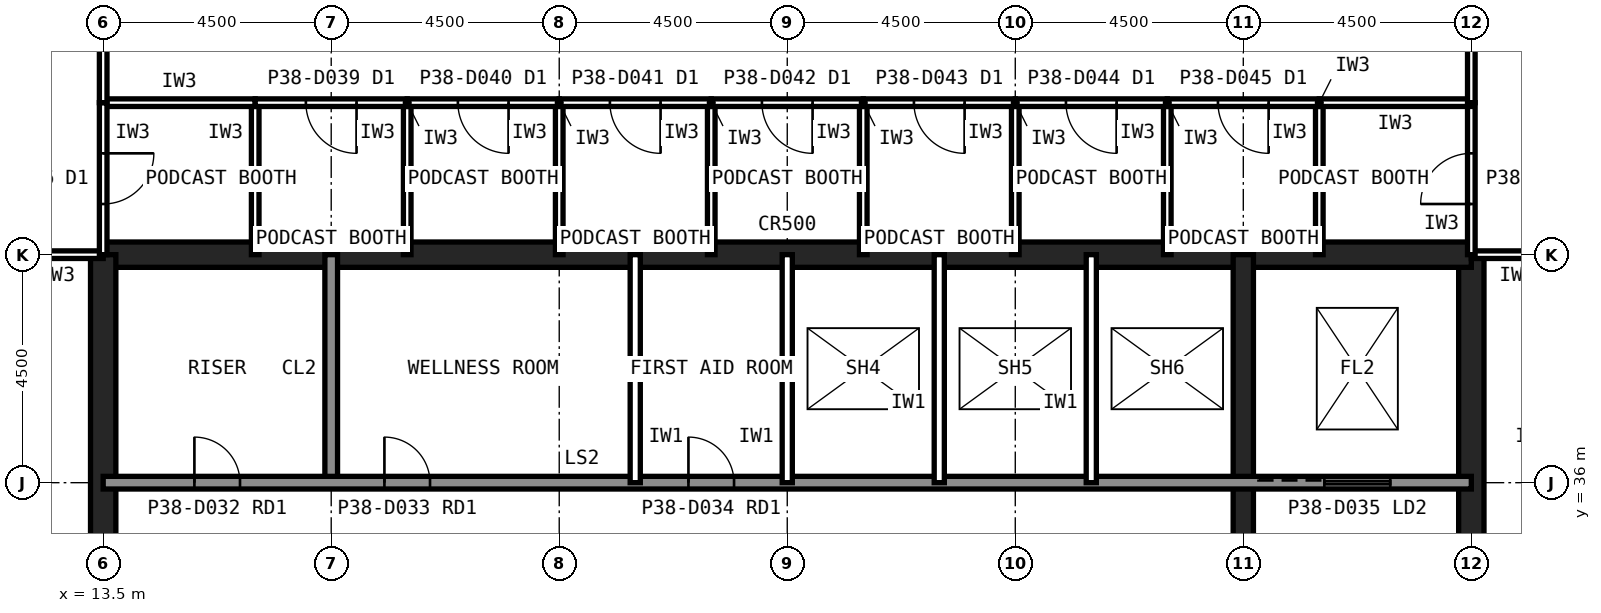
"""IFC4 building model, lengths in metres.
Left out: names, types, materials, properties, quantities, classifications, styles, units other than length and angle.
Written with IfcOpenShell. Run it as: python <this file> out.ifc"""

import sys

from ifc_helpers import new_model, si_unit, direction, frame, frame_2d, origin, place, context, subcontext, project, spatial, rectangle, extrude, element, fill, save


model = new_model("IFC4")
c1 = context("Model", 3, precision=1e-05, world=origin(), true_north=direction((0.0, 1.0)))
c2 = subcontext(c1, "Body", "Model", "MODEL_VIEW")
j1 = project(units=[si_unit("LENGTHUNIT", "METRE"), si_unit("PLANEANGLEUNIT", "RADIAN")], contexts=[c1])
p1 = place(None, origin())
s1 = spatial("IfcSite", under=j1, at=p1, CompositionType="ELEMENT")
p2 = place(p1, origin())
s2 = spatial("IfcBuilding", under=s1, at=p2, CompositionType="ELEMENT")
p3 = place(p2, frame((0.0, 0.0, 159.6)))
s3 = spatial("IfcBuildingStorey", under=s2, at=p3, CompositionType="ELEMENT", Elevation=159.6)
p4 = place(p3, frame((40.5, 13.5, 0.0), z_axis=(0.0, 0.0, 1.0), x_axis=(0.0, 1.0, 0.0)))
e1 = element("IfcWall", 1, at=p4, inside=s3, PredefinedType="SHEAR", context=c2, shape_type="SweptSolid", body=[
    extrude(rectangle(XDim=27.0, YDim=0.5, at=frame_2d((13.5, 0.0))), origin(), (0.0, 0.0, 1.0), 4.0),
])
p5 = place(p4, frame((5.85, 0.0, 0.0)))
e2 = element("IfcOpeningElement", 2, at=p5, cuts=e1, PredefinedType="OPENING", context=c2, shape_type="SweptSolid", body=[
    extrude(rectangle(XDim=1.8, YDim=2.1, at=frame_2d((0.9, 1.05))), frame((0.0, 0.26, 0.0), z_axis=(0.0, -1.0, 0.0), x_axis=(1.0, 0.0, 0.0)), (0.0, 0.0, 1.0), 0.52),
])
p6 = place(p4, frame((19.65, 0.0, 0.0)))
e3 = element("IfcOpeningElement", 3, at=p6, cuts=e1, PredefinedType="OPENING", context=c2, shape_type="SweptSolid", body=[
    extrude(rectangle(XDim=1.2, YDim=2.1, at=frame_2d((0.6, 1.05))), frame((0.0, 0.26, 0.0), z_axis=(0.0, -1.0, 0.0), x_axis=(1.0, 0.0, 0.0)), (0.0, 0.0, 1.0), 0.52),
])
p7 = place(p3, frame((40.5, 40.5, 0.0), z_axis=(0.0, 0.0, 1.0), x_axis=(-1.0, 0.0, 0.0)))
e4 = element("IfcWall", 4, at=p7, inside=s3, PredefinedType="SHEAR", context=c2, shape_type="SweptSolid", body=[
    extrude(rectangle(XDim=27.0, YDim=0.5, at=frame_2d((13.5, 0.0))), origin(), (0.0, 0.0, 1.0), 4.0),
])
p8 = place(p3, frame((13.5, 40.5, 0.0), z_axis=(0.0, 0.0, 1.0), x_axis=(0.0, -1.0, 0.0)))
e5 = element("IfcWall", 5, at=p8, inside=s3, PredefinedType="SHEAR", context=c2, shape_type="SweptSolid", body=[
    extrude(rectangle(XDim=27.0, YDim=0.5, at=frame_2d((13.5, 0.0))), origin(), (0.0, 0.0, 1.0), 4.0),
])
p9 = place(p8, frame((19.65, 0.0, 0.0)))
e6 = element("IfcOpeningElement", 6, at=p9, cuts=e5, PredefinedType="OPENING", context=c2, shape_type="SweptSolid", body=[
    extrude(rectangle(XDim=1.2, YDim=2.1, at=frame_2d((0.6, 1.05))), frame((0.0, 0.26, 0.0), z_axis=(0.0, -1.0, 0.0), x_axis=(1.0, 0.0, 0.0)), (0.0, 0.0, 1.0), 0.52),
])
p10 = place(p8, frame((5.85, 0.0, 0.0)))
e7 = element("IfcOpeningElement", 7, at=p10, cuts=e5, PredefinedType="OPENING", context=c2, shape_type="SweptSolid", body=[
    extrude(rectangle(XDim=1.8, YDim=2.1, at=frame_2d((0.9, 1.05))), frame((0.0, 0.26, 0.0), z_axis=(0.0, -1.0, 0.0), x_axis=(1.0, 0.0, 0.0)), (0.0, 0.0, 1.0), 0.52),
])
p11 = place(p3, frame((18.0, 36.0, 0.0), z_axis=(0.0, 0.0, 1.0), x_axis=(0.0, 1.0, 0.0)))
e8 = element("IfcWall", 8, at=p11, inside=s3, PredefinedType="SOLIDWALL", context=c2, shape_type="SweptSolid", body=[
    extrude(rectangle(XDim=4.5, YDim=0.25, at=frame_2d((2.25, 0.0))), origin(), (0.0, 0.0, 1.0), 3.84),
])
p12 = place(p3, frame((36.0, 22.5, 0.0), z_axis=(0.0, 0.0, 1.0), x_axis=(0.0, 1.0, 0.0)))
e9 = element("IfcWall", 9, at=p12, inside=s3, PredefinedType="SHEAR", context=c2, shape_type="SweptSolid", body=[
    extrude(rectangle(XDim=18.0, YDim=0.4, at=frame_2d((9.0, 0.0))), origin(), (0.0, 0.0, 1.0), 4.0),
])
p13 = place(p3, frame((13.5, 36.0, 0.0), z_axis=(0.0, 0.0, 1.0), x_axis=(1.0, 0.0, 0.0)))
e10 = element("IfcWall", 10, at=p13, inside=s3, PredefinedType="SOLIDWALL", context=c2, shape_type="SweptSolid", body=[
    extrude(rectangle(XDim=27.0, YDim=0.25, at=frame_2d((13.5, 0.0))), origin(), (0.0, 0.0, 1.0), 3.84),
])
p14 = place(p13, frame((1.8, 0.0, 0.0)))
e11 = element("IfcOpeningElement", 11, at=p14, cuts=e10, PredefinedType="OPENING", context=c2, shape_type="SweptSolid", body=[
    extrude(rectangle(XDim=0.9, YDim=2.1, at=frame_2d((0.45, 1.05))), frame((0.0, 0.135, 0.0), z_axis=(0.0, -1.0, 0.0), x_axis=(1.0, 0.0, 0.0)), (0.0, 0.0, 1.0), 0.27),
])
p15 = place(p13, frame((5.55, 0.0, 0.0)))
e12 = element("IfcOpeningElement", 12, at=p15, cuts=e10, PredefinedType="OPENING", context=c2, shape_type="SweptSolid", body=[
    extrude(rectangle(XDim=0.9, YDim=2.1, at=frame_2d((0.45, 1.05))), frame((0.0, 0.135, 0.0), z_axis=(0.0, -1.0, 0.0), x_axis=(1.0, 0.0, 0.0)), (0.0, 0.0, 1.0), 0.27),
])
p16 = place(p13, frame((8.55, 0.0, 0.0)))
e13 = element("IfcOpeningElement", 13, at=p16, cuts=e10, PredefinedType="OPENING", context=c2, shape_type="SweptSolid", body=[
    extrude(rectangle(XDim=0.9, YDim=2.1, at=frame_2d((0.45, 1.05))), frame((0.0, 0.135, 0.0), z_axis=(0.0, -1.0, 0.0), x_axis=(1.0, 0.0, 0.0)), (0.0, 0.0, 1.0), 0.27),
])
p17 = place(p13, frame((11.55, 0.0, 0.0)))
e14 = element("IfcOpeningElement", 14, at=p17, cuts=e10, PredefinedType="OPENING", context=c2, shape_type="SweptSolid", body=[
    extrude(rectangle(XDim=0.9, YDim=2.1, at=frame_2d((0.45, 1.05))), frame((0.0, 0.135, 0.0), z_axis=(0.0, -1.0, 0.0), x_axis=(1.0, 0.0, 0.0)), (0.0, 0.0, 1.0), 0.27),
])
p18 = place(p13, frame((24.1, 0.0, 0.0)))
e15 = element("IfcOpeningElement", 15, at=p18, cuts=e10, PredefinedType="OPENING", context=c2, shape_type="SweptSolid", body=[
    extrude(rectangle(XDim=1.3, YDim=2.2, at=frame_2d((0.65, 1.1))), frame((0.0, 0.135, 0.0), z_axis=(0.0, -1.0, 0.0), x_axis=(1.0, 0.0, 0.0)), (0.0, 0.0, 1.0), 0.27),
])
for number, where, z_axis, x_axis in (
    (16, (21.0, 36.0, 0.0), (0.0, 0.0, 1.0), (0.0, 1.0, 0.0)),
    (17, (24.0, 36.0, 0.0), (0.0, 0.0, 1.0), (0.0, 1.0, 0.0)),
    (18, (27.0, 36.0, 0.0), (0.0, 0.0, 1.0), (0.0, 1.0, 0.0)),
    (19, (30.0, 36.0, 0.0), (0.0, 0.0, 1.0), (0.0, 1.0, 0.0)),
    (20, (33.0, 36.0, 0.0), (0.0, 0.0, 1.0), (0.0, 1.0, 0.0)),
):
    element("IfcWall", number, at=place(p3, frame(where, z_axis=z_axis, x_axis=x_axis)), inside=s3, PredefinedType="PARTITIONING", context=c2, shape_type="SweptSolid", body=[
        extrude(rectangle(XDim=4.5, YDim=0.2, at=frame_2d((2.25, 0.0))), origin(), (0.0, 0.0, 1.0), 3.84),
    ])
for number, where, z_axis, x_axis in (
    (21, (22.5, 43.5, 0.0), (0.0, 0.0, 1.0), (0.0, 1.0, 0.0)),
    (22, (42.3, 40.5, 0.0), (0.0, 0.0, 1.0), (-1.0, 0.0, 0.0)),
):
    element("IfcWall", number, at=place(p3, frame(where, z_axis=z_axis, x_axis=x_axis)), inside=s3, PredefinedType="PARTITIONING", context=c2, shape_type="SweptSolid", body=[
        extrude(rectangle(XDim=1.8, YDim=0.15, at=frame_2d((0.9, 0.0))), origin(), (0.0, 0.0, 1.0), 2.989),
    ])
for number, where, z_axis, x_axis in (
    (23, (16.5, 40.5, 0.0), (0.0, 0.0, 1.0), (0.0, 1.0, 0.0)),
    (24, (16.5, 43.5, 0.0), (0.0, 0.0, 1.0), (-1.0, 0.0, 0.0)),
):
    element("IfcWall", number, at=place(p3, frame(where, z_axis=z_axis, x_axis=x_axis)), inside=s3, PredefinedType="PARTITIONING", context=c2, shape_type="SweptSolid", body=[
        extrude(rectangle(XDim=3.0, YDim=0.15, at=frame_2d((1.5, 0.0))), origin(), (0.0, 0.0, 1.0), 3.84),
    ])
p19 = place(p3, frame((13.5, 43.5, 0.0), z_axis=(0.0, 0.0, 1.0), x_axis=(0.0, -1.0, 0.0)))
e25 = element("IfcWall", 25, at=p19, inside=s3, PredefinedType="PARTITIONING", context=c2, shape_type="SweptSolid", body=[
    extrude(rectangle(XDim=3.0, YDim=0.15, at=frame_2d((1.5, 0.0))), origin(), (0.0, 0.0, 1.0), 2.989),
])
p20 = place(p19, frame((1.0, 0.0, 0.0)))
e26 = element("IfcOpeningElement", 26, at=p20, cuts=e25, PredefinedType="OPENING", context=c2, shape_type="SweptSolid", body=[
    extrude(rectangle(XDim=1.0, YDim=2.1, at=frame_2d((0.5, 1.05))), frame((0.0, 0.085, 0.0), z_axis=(0.0, -1.0, 0.0), x_axis=(1.0, 0.0, 0.0)), (0.0, 0.0, 1.0), 0.17),
])
p21 = place(p3, frame((19.5, 40.5, 0.0), z_axis=(0.0, 0.0, 1.0), x_axis=(0.0, 1.0, 0.0)))
e27 = element("IfcWall", 27, at=p21, inside=s3, PredefinedType="PARTITIONING", context=c2, shape_type="SweptSolid", body=[
    extrude(rectangle(XDim=3.0, YDim=0.15, at=frame_2d((1.5, 0.0))), origin(), (0.0, 0.0, 1.0), 3.84),
])
p22 = place(p3, frame((19.5, 43.5, 0.0), z_axis=(0.0, 0.0, 1.0), x_axis=(-1.0, 0.0, 0.0)))
e28 = element("IfcWall", 28, at=p22, inside=s3, PredefinedType="PARTITIONING", context=c2, shape_type="SweptSolid", body=[
    extrude(rectangle(XDim=3.0, YDim=0.15, at=frame_2d((1.5, 0.0))), origin(), (0.0, 0.0, 1.0), 3.84),
])
p23 = place(p22, frame((1.0, 0.0, 0.0)))
e29 = element("IfcOpeningElement", 29, at=p23, cuts=e28, PredefinedType="OPENING", context=c2, shape_type="SweptSolid", body=[
    extrude(rectangle(XDim=1.0, YDim=2.1, at=frame_2d((0.5, 1.05))), frame((0.0, 0.085, 0.0), z_axis=(0.0, -1.0, 0.0), x_axis=(1.0, 0.0, 0.0)), (0.0, 0.0, 1.0), 0.17),
])
p24 = place(p3, frame((22.5, 40.5, 0.0), z_axis=(0.0, 0.0, 1.0), x_axis=(0.0, 1.0, 0.0)))
e30 = element("IfcWall", 30, at=p24, inside=s3, PredefinedType="PARTITIONING", context=c2, shape_type="SweptSolid", body=[
    extrude(rectangle(XDim=3.0, YDim=0.15, at=frame_2d((1.5, 0.0))), origin(), (0.0, 0.0, 1.0), 2.989),
])
p25 = place(p3, frame((22.5, 43.5, 0.0), z_axis=(0.0, 0.0, 1.0), x_axis=(-1.0, 0.0, 0.0)))
e31 = element("IfcWall", 31, at=p25, inside=s3, PredefinedType="PARTITIONING", context=c2, shape_type="SweptSolid", body=[
    extrude(rectangle(XDim=3.0, YDim=0.15, at=frame_2d((1.5, 0.0))), origin(), (0.0, 0.0, 1.0), 3.84),
])
p26 = place(p25, frame((1.0, 0.0, 0.0)))
e32 = element("IfcOpeningElement", 32, at=p26, cuts=e31, PredefinedType="OPENING", context=c2, shape_type="SweptSolid", body=[
    extrude(rectangle(XDim=1.0, YDim=2.1, at=frame_2d((0.5, 1.05))), frame((0.0, 0.085, 0.0), z_axis=(0.0, -1.0, 0.0), x_axis=(1.0, 0.0, 0.0)), (0.0, 0.0, 1.0), 0.17),
])
p27 = place(p3, frame((25.5, 40.5, 0.0), z_axis=(0.0, 0.0, 1.0), x_axis=(0.0, 1.0, 0.0)))
e33 = element("IfcWall", 33, at=p27, inside=s3, PredefinedType="PARTITIONING", context=c2, shape_type="SweptSolid", body=[
    extrude(rectangle(XDim=3.0, YDim=0.15, at=frame_2d((1.5, 0.0))), origin(), (0.0, 0.0, 1.0), 3.84),
])
p28 = place(p3, frame((25.5, 43.5, 0.0), z_axis=(0.0, 0.0, 1.0), x_axis=(-1.0, 0.0, 0.0)))
e34 = element("IfcWall", 34, at=p28, inside=s3, PredefinedType="PARTITIONING", context=c2, shape_type="SweptSolid", body=[
    extrude(rectangle(XDim=3.0, YDim=0.15, at=frame_2d((1.5, 0.0))), origin(), (0.0, 0.0, 1.0), 3.84),
])
p29 = place(p28, frame((1.0, 0.0, 0.0)))
e35 = element("IfcOpeningElement", 35, at=p29, cuts=e34, PredefinedType="OPENING", context=c2, shape_type="SweptSolid", body=[
    extrude(rectangle(XDim=1.0, YDim=2.1, at=frame_2d((0.5, 1.05))), frame((0.0, 0.085, 0.0), z_axis=(0.0, -1.0, 0.0), x_axis=(1.0, 0.0, 0.0)), (0.0, 0.0, 1.0), 0.17),
])
p30 = place(p3, frame((28.5, 40.5, 0.0), z_axis=(0.0, 0.0, 1.0), x_axis=(0.0, 1.0, 0.0)))
e36 = element("IfcWall", 36, at=p30, inside=s3, PredefinedType="PARTITIONING", context=c2, shape_type="SweptSolid", body=[
    extrude(rectangle(XDim=3.0, YDim=0.15, at=frame_2d((1.5, 0.0))), origin(), (0.0, 0.0, 1.0), 3.84),
])
p31 = place(p3, frame((28.5, 43.5, 0.0), z_axis=(0.0, 0.0, 1.0), x_axis=(-1.0, 0.0, 0.0)))
e37 = element("IfcWall", 37, at=p31, inside=s3, PredefinedType="PARTITIONING", context=c2, shape_type="SweptSolid", body=[
    extrude(rectangle(XDim=3.0, YDim=0.15, at=frame_2d((1.5, 0.0))), origin(), (0.0, 0.0, 1.0), 3.84),
])
p32 = place(p31, frame((1.0, 0.0, 0.0)))
e38 = element("IfcOpeningElement", 38, at=p32, cuts=e37, PredefinedType="OPENING", context=c2, shape_type="SweptSolid", body=[
    extrude(rectangle(XDim=1.0, YDim=2.1, at=frame_2d((0.5, 1.05))), frame((0.0, 0.085, 0.0), z_axis=(0.0, -1.0, 0.0), x_axis=(1.0, 0.0, 0.0)), (0.0, 0.0, 1.0), 0.17),
])
p33 = place(p3, frame((31.5, 40.5, 0.0), z_axis=(0.0, 0.0, 1.0), x_axis=(0.0, 1.0, 0.0)))
e39 = element("IfcWall", 39, at=p33, inside=s3, PredefinedType="PARTITIONING", context=c2, shape_type="SweptSolid", body=[
    extrude(rectangle(XDim=3.0, YDim=0.15, at=frame_2d((1.5, 0.0))), origin(), (0.0, 0.0, 1.0), 2.989),
])
p34 = place(p3, frame((31.5, 43.5, 0.0), z_axis=(0.0, 0.0, 1.0), x_axis=(-1.0, 0.0, 0.0)))
e40 = element("IfcWall", 40, at=p34, inside=s3, PredefinedType="PARTITIONING", context=c2, shape_type="SweptSolid", body=[
    extrude(rectangle(XDim=3.0, YDim=0.15, at=frame_2d((1.5, 0.0))), origin(), (0.0, 0.0, 1.0), 3.84),
])
p35 = place(p34, frame((1.0, 0.0, 0.0)))
e41 = element("IfcOpeningElement", 41, at=p35, cuts=e40, PredefinedType="OPENING", context=c2, shape_type="SweptSolid", body=[
    extrude(rectangle(XDim=1.0, YDim=2.1, at=frame_2d((0.5, 1.05))), frame((0.0, 0.085, 0.0), z_axis=(0.0, -1.0, 0.0), x_axis=(1.0, 0.0, 0.0)), (0.0, 0.0, 1.0), 0.17),
])
p36 = place(p3, frame((34.5, 40.5, 0.0), z_axis=(0.0, 0.0, 1.0), x_axis=(0.0, 1.0, 0.0)))
e42 = element("IfcWall", 42, at=p36, inside=s3, PredefinedType="PARTITIONING", context=c2, shape_type="SweptSolid", body=[
    extrude(rectangle(XDim=3.0, YDim=0.15, at=frame_2d((1.5, 0.0))), origin(), (0.0, 0.0, 1.0), 3.84),
])
p37 = place(p3, frame((34.5, 43.5, 0.0), z_axis=(0.0, 0.0, 1.0), x_axis=(-1.0, 0.0, 0.0)))
e43 = element("IfcWall", 43, at=p37, inside=s3, PredefinedType="PARTITIONING", context=c2, shape_type="SweptSolid", body=[
    extrude(rectangle(XDim=3.0, YDim=0.15, at=frame_2d((1.5, 0.0))), origin(), (0.0, 0.0, 1.0), 3.84),
])
p38 = place(p37, frame((1.0, 0.0, 0.0)))
e44 = element("IfcOpeningElement", 44, at=p38, cuts=e43, PredefinedType="OPENING", context=c2, shape_type="SweptSolid", body=[
    extrude(rectangle(XDim=1.0, YDim=2.1, at=frame_2d((0.5, 1.05))), frame((0.0, 0.085, 0.0), z_axis=(0.0, -1.0, 0.0), x_axis=(1.0, 0.0, 0.0)), (0.0, 0.0, 1.0), 0.17),
])
p39 = place(p3, frame((37.5, 40.5, 0.0), z_axis=(0.0, 0.0, 1.0), x_axis=(0.0, 1.0, 0.0)))
e45 = element("IfcWall", 45, at=p39, inside=s3, PredefinedType="PARTITIONING", context=c2, shape_type="SweptSolid", body=[
    extrude(rectangle(XDim=3.0, YDim=0.15, at=frame_2d((1.5, 0.0))), origin(), (0.0, 0.0, 1.0), 3.84),
])
p40 = place(p3, frame((37.5, 43.5, 0.0), z_axis=(0.0, 0.0, 1.0), x_axis=(-1.0, 0.0, 0.0)))
e46 = element("IfcWall", 46, at=p40, inside=s3, PredefinedType="PARTITIONING", context=c2, shape_type="SweptSolid", body=[
    extrude(rectangle(XDim=3.0, YDim=0.15, at=frame_2d((1.5, 0.0))), origin(), (0.0, 0.0, 1.0), 3.84),
])
p41 = place(p40, frame((1.0, 0.0, 0.0)))
e47 = element("IfcOpeningElement", 47, at=p41, cuts=e46, PredefinedType="OPENING", context=c2, shape_type="SweptSolid", body=[
    extrude(rectangle(XDim=1.0, YDim=2.1, at=frame_2d((0.5, 1.05))), frame((0.0, 0.085, 0.0), z_axis=(0.0, -1.0, 0.0), x_axis=(1.0, 0.0, 0.0)), (0.0, 0.0, 1.0), 0.17),
])
p42 = place(p3, frame((40.5, 40.5, 0.0), z_axis=(0.0, 0.0, 1.0), x_axis=(0.0, 1.0, 0.0)))
e48 = element("IfcWall", 48, at=p42, inside=s3, PredefinedType="PARTITIONING", context=c2, shape_type="SweptSolid", body=[
    extrude(rectangle(XDim=3.0, YDim=0.15, at=frame_2d((1.5, 0.0))), origin(), (0.0, 0.0, 1.0), 2.989),
])
p43 = place(p42, frame((1.0, 0.0, 0.0)))
e49 = element("IfcOpeningElement", 49, at=p43, cuts=e48, PredefinedType="OPENING", context=c2, shape_type="SweptSolid", body=[
    extrude(rectangle(XDim=1.0, YDim=2.1, at=frame_2d((0.5, 1.05))), frame((0.0, 0.085, 0.0), z_axis=(0.0, -1.0, 0.0), x_axis=(1.0, 0.0, 0.0)), (0.0, 0.0, 1.0), 0.17),
])
p44 = place(p3, frame((40.5, 43.5, 0.0), z_axis=(0.0, 0.0, 1.0), x_axis=(-1.0, 0.0, 0.0)))
e50 = element("IfcWall", 50, at=p44, inside=s3, PredefinedType="PARTITIONING", context=c2, shape_type="SweptSolid", body=[
    extrude(rectangle(XDim=3.0, YDim=0.15, at=frame_2d((1.5, 0.0))), origin(), (0.0, 0.0, 1.0), 3.84),
])
p45 = place(p3, frame((40.5, 49.13, 0.0), z_axis=(0.0, 0.0, 1.0), x_axis=(0.0, -1.0, 0.0)))
e51 = element("IfcWall", 51, at=p45, inside=s3, PredefinedType="PARTITIONING", context=c2, shape_type="SweptSolid", body=[
    extrude(rectangle(XDim=5.63, YDim=0.15, at=frame_2d((2.815, 0.0))), origin(), (0.0, 0.0, 1.0), 2.989),
])
p46 = place(p45, frame((2.315, 0.0, 0.0)))
e52 = element("IfcOpeningElement", 52, at=p46, cuts=e51, PredefinedType="OPENING", context=c2, shape_type="SweptSolid", body=[
    extrude(rectangle(XDim=1.0, YDim=2.1, at=frame_2d((0.5, 1.05))), frame((0.0, 0.085, 0.0), z_axis=(0.0, -1.0, 0.0), x_axis=(1.0, 0.0, 0.0)), (0.0, 0.0, 1.0), 0.17),
])
p47 = place(p14, origin())
e53 = element("IfcDoor", 53, at=p47, inside=s3, OperationType="SINGLE_SWING_LEFT", PredefinedType="DOOR", context=c2, shape_type="SweptSolid", body=[
    extrude(rectangle(XDim=0.9, YDim=2.1, at=frame_2d((0.45, 1.05))), frame((0.0, 0.025, 0.0), z_axis=(0.0, -1.0, 0.0), x_axis=(1.0, 0.0, 0.0)), (0.0, 0.0, 1.0), 0.05),
])
fill(e11, e53)
p48 = place(p15, origin())
e54 = element("IfcDoor", 54, at=p48, inside=s3, OperationType="SINGLE_SWING_LEFT", PredefinedType="DOOR", context=c2, shape_type="SweptSolid", body=[
    extrude(rectangle(XDim=0.9, YDim=2.1, at=frame_2d((0.45, 1.05))), frame((0.0, 0.025, 0.0), z_axis=(0.0, -1.0, 0.0), x_axis=(1.0, 0.0, 0.0)), (0.0, 0.0, 1.0), 0.05),
])
fill(e12, e54)
p49 = place(p16, origin())
e55 = element("IfcDoor", 55, at=p49, inside=s3, OperationType="SINGLE_SWING_LEFT", PredefinedType="DOOR", context=c2, shape_type="SweptSolid", body=[
    extrude(rectangle(XDim=0.9, YDim=2.1, at=frame_2d((0.45, 1.05))), frame((0.0, 0.025, 0.0), z_axis=(0.0, -1.0, 0.0), x_axis=(1.0, 0.0, 0.0)), (0.0, 0.0, 1.0), 0.05),
])
fill(e13, e55)
p50 = place(p17, origin())
e56 = element("IfcDoor", 56, at=p50, inside=s3, OperationType="SINGLE_SWING_LEFT", PredefinedType="DOOR", context=c2, shape_type="SweptSolid", body=[
    extrude(rectangle(XDim=0.9, YDim=2.1, at=frame_2d((0.45, 1.05))), frame((0.0, 0.025, 0.0), z_axis=(0.0, -1.0, 0.0), x_axis=(1.0, 0.0, 0.0)), (0.0, 0.0, 1.0), 0.05),
])
fill(e14, e56)
p51 = place(p18, origin())
e57 = element("IfcDoor", 57, at=p51, inside=s3, OperationType="SLIDING_TO_LEFT", PredefinedType="DOOR", context=c2, shape_type="SweptSolid", body=[
    extrude(rectangle(XDim=1.3, YDim=2.2, at=frame_2d((0.65, 1.1))), frame((0.0, 0.025, 0.0), z_axis=(0.0, -1.0, 0.0), x_axis=(1.0, 0.0, 0.0)), (0.0, 0.0, 1.0), 0.05),
])
fill(e15, e57)
p52 = place(p20, origin())
e58 = element("IfcDoor", 58, at=p52, inside=s3, OperationType="SINGLE_SWING_LEFT", PredefinedType="DOOR", context=c2, shape_type="SweptSolid", body=[
    extrude(rectangle(XDim=1.0, YDim=2.1, at=frame_2d((0.5, 1.05))), frame((0.0, 0.025, 0.0), z_axis=(0.0, -1.0, 0.0), x_axis=(1.0, 0.0, 0.0)), (0.0, 0.0, 1.0), 0.05),
])
fill(e26, e58)
p53 = place(p23, origin())
e59 = element("IfcDoor", 59, at=p53, inside=s3, OperationType="SINGLE_SWING_LEFT", PredefinedType="DOOR", context=c2, shape_type="SweptSolid", body=[
    extrude(rectangle(XDim=1.0, YDim=2.1, at=frame_2d((0.5, 1.05))), frame((0.0, 0.025, 0.0), z_axis=(0.0, -1.0, 0.0), x_axis=(1.0, 0.0, 0.0)), (0.0, 0.0, 1.0), 0.05),
])
fill(e29, e59)
p54 = place(p26, origin())
e60 = element("IfcDoor", 60, at=p54, inside=s3, OperationType="SINGLE_SWING_LEFT", PredefinedType="DOOR", context=c2, shape_type="SweptSolid", body=[
    extrude(rectangle(XDim=1.0, YDim=2.1, at=frame_2d((0.5, 1.05))), frame((0.0, 0.025, 0.0), z_axis=(0.0, -1.0, 0.0), x_axis=(1.0, 0.0, 0.0)), (0.0, 0.0, 1.0), 0.05),
])
fill(e32, e60)
p55 = place(p29, origin())
e61 = element("IfcDoor", 61, at=p55, inside=s3, OperationType="SINGLE_SWING_LEFT", PredefinedType="DOOR", context=c2, shape_type="SweptSolid", body=[
    extrude(rectangle(XDim=1.0, YDim=2.1, at=frame_2d((0.5, 1.05))), frame((0.0, 0.025, 0.0), z_axis=(0.0, -1.0, 0.0), x_axis=(1.0, 0.0, 0.0)), (0.0, 0.0, 1.0), 0.05),
])
fill(e35, e61)
p56 = place(p32, origin())
e62 = element("IfcDoor", 62, at=p56, inside=s3, OperationType="SINGLE_SWING_LEFT", PredefinedType="DOOR", context=c2, shape_type="SweptSolid", body=[
    extrude(rectangle(XDim=1.0, YDim=2.1, at=frame_2d((0.5, 1.05))), frame((0.0, 0.025, 0.0), z_axis=(0.0, -1.0, 0.0), x_axis=(1.0, 0.0, 0.0)), (0.0, 0.0, 1.0), 0.05),
])
fill(e38, e62)
p57 = place(p35, origin())
e63 = element("IfcDoor", 63, at=p57, inside=s3, OperationType="SINGLE_SWING_LEFT", PredefinedType="DOOR", context=c2, shape_type="SweptSolid", body=[
    extrude(rectangle(XDim=1.0, YDim=2.1, at=frame_2d((0.5, 1.05))), frame((0.0, 0.025, 0.0), z_axis=(0.0, -1.0, 0.0), x_axis=(1.0, 0.0, 0.0)), (0.0, 0.0, 1.0), 0.05),
])
fill(e41, e63)
p58 = place(p38, origin())
e64 = element("IfcDoor", 64, at=p58, inside=s3, OperationType="SINGLE_SWING_LEFT", PredefinedType="DOOR", context=c2, shape_type="SweptSolid", body=[
    extrude(rectangle(XDim=1.0, YDim=2.1, at=frame_2d((0.5, 1.05))), frame((0.0, 0.025, 0.0), z_axis=(0.0, -1.0, 0.0), x_axis=(1.0, 0.0, 0.0)), (0.0, 0.0, 1.0), 0.05),
])
fill(e44, e64)
p59 = place(p41, origin())
e65 = element("IfcDoor", 65, at=p59, inside=s3, OperationType="SINGLE_SWING_LEFT", PredefinedType="DOOR", context=c2, shape_type="SweptSolid", body=[
    extrude(rectangle(XDim=1.0, YDim=2.1, at=frame_2d((0.5, 1.05))), frame((0.0, 0.025, 0.0), z_axis=(0.0, -1.0, 0.0), x_axis=(1.0, 0.0, 0.0)), (0.0, 0.0, 1.0), 0.05),
])
fill(e47, e65)
p60 = place(p43, origin())
e66 = element("IfcDoor", 66, at=p60, inside=s3, OperationType="SINGLE_SWING_LEFT", PredefinedType="DOOR", context=c2, shape_type="SweptSolid", body=[
    extrude(rectangle(XDim=1.0, YDim=2.1, at=frame_2d((0.5, 1.05))), frame((0.0, 0.025, 0.0), z_axis=(0.0, -1.0, 0.0), x_axis=(1.0, 0.0, 0.0)), (0.0, 0.0, 1.0), 0.05),
])
fill(e49, e66)
save(model, sys.argv[1])
